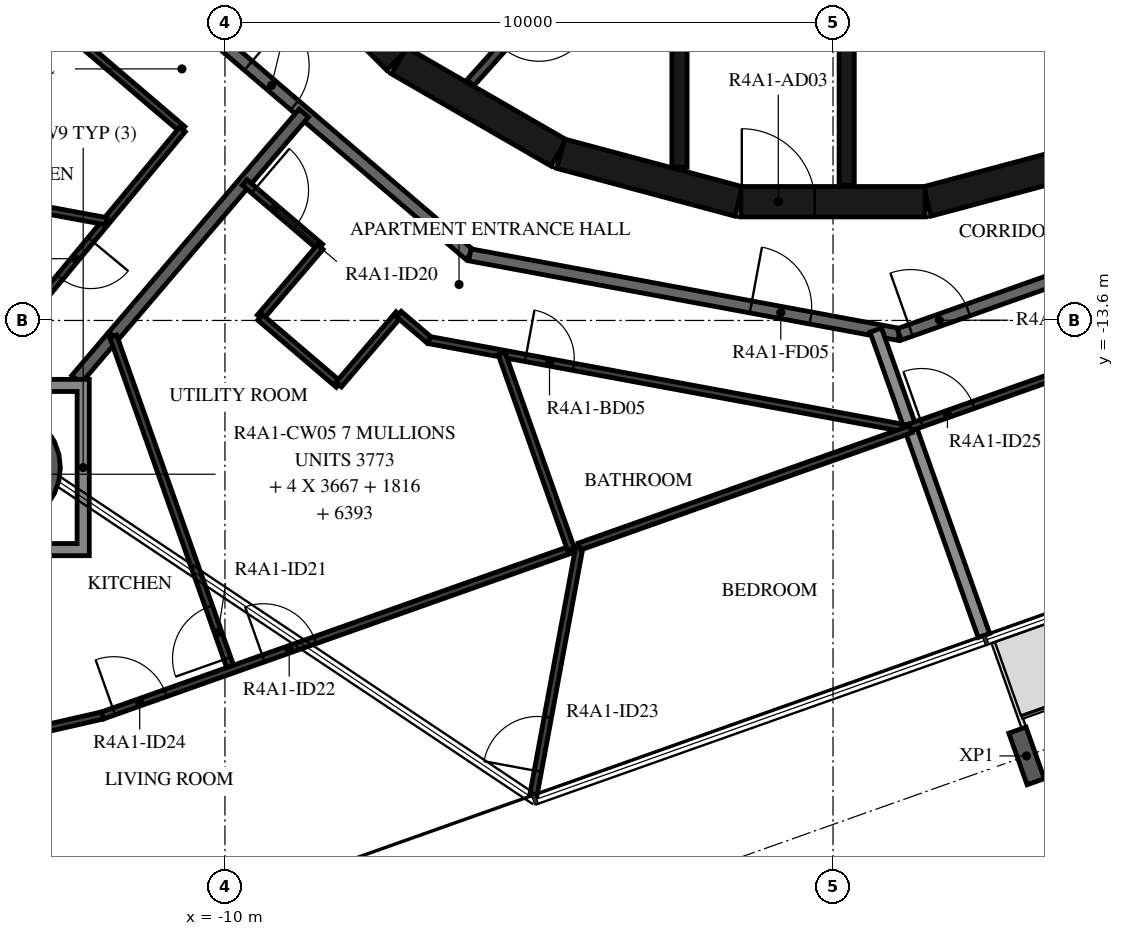
"""IFC4 building model, lengths in metres.
Left out: names, types, materials, properties, quantities, classifications, styles, units other than length and angle.
Written with IfcOpenShell. Run it as: python <this file> out.ifc"""

import sys

from ifc_helpers import new_model, si_unit, direction, frame, frame_2d, origin, origin_2d, place, context, subcontext, project, spatial, polyline, rectangle, hollow_circle, i_section, outline, extrude, element, fill, save


model = new_model("IFC4")
c1 = context("Model", 3, precision=1e-05, world=origin(), true_north=direction((0.0, 1.0)))
c2 = subcontext(c1, "Body", "Model", "MODEL_VIEW")
j1 = project(units=[si_unit("LENGTHUNIT", "METRE"), si_unit("PLANEANGLEUNIT", "RADIAN")], contexts=[c1])
p1 = place(None, origin())
s1 = spatial("IfcSite", under=j1, at=p1, CompositionType="ELEMENT")
p2 = place(p1, origin())
s2 = spatial("IfcBuilding", under=s1, at=p2, CompositionType="ELEMENT")
p3 = place(p2, frame((0.0, 0.0, 155.2)))
s3 = spatial("IfcBuildingStorey", under=s2, at=p3, CompositionType="ELEMENT", Elevation=155.2)
p4 = place(p3, frame((-13.681, -16.019, -0.38), z_axis=(0.0, 0.0, 1.0), x_axis=(1.0, 0.0, 0.0)))
e1 = element("IfcColumn", 1, at=p4, inside=s3, PredefinedType="COLUMN", context=c2, shape_type="SweptSolid", body=[
    extrude(hollow_circle(Radius=0.975, WallThickness=0.045, at=origin_2d()), origin(), (0.0, 0.0, 1.0), 3.5),
])
p5 = place(p3, frame((3.183, -20.761, -0.38), z_axis=(0.0, 0.0, 1.0), x_axis=(-0.942641392079, -0.333807138839, 0.0)))
e2 = element("IfcColumn", 2, at=p5, inside=s3, PredefinedType="COLUMN", context=c2, shape_type="SweptSolid", body=[
    extrude(i_section(OverallWidth=0.3, OverallDepth=0.9, WebThickness=0.019, FlangeThickness=0.035, FilletRadius=0.03, at=origin_2d()), origin(), (0.0, 0.0, 1.0), 3.5),
])
p6 = place(p3, frame((1.55, -11.643, 0.0), z_axis=(0.0, 0.0, 1.0), x_axis=(0.965948410781, 0.258734743916, 0.0)))
e3 = element("IfcWall", 3, at=p6, inside=s3, PredefinedType="SHEAR", context=c2, shape_type="SweptSolid", body=[
    extrude(rectangle(XDim=3.033, YDim=0.5, at=frame_2d((1.516, 0.0))), origin(), (0.0, 0.0, 1.0), 3.12),
])
p7 = place(p3, frame((-9.308, -7.164, 0.0), z_axis=(0.0, 0.0, 1.0), x_axis=(0.707106781187, -0.707106781187, 0.0)))
e4 = element("IfcWall", 4, at=p7, inside=s3, PredefinedType="SHEAR", context=c2, shape_type="SweptSolid", body=[
    extrude(rectangle(XDim=3.032, YDim=0.5, at=frame_2d((1.516, 0.0))), origin(), (0.0, 0.0, 1.0), 3.12),
])
for number, where, z_axis, x_axis in (
    (5, (-7.137, -9.329, 0.0), (0.0, 0.0, 1.0), (0.866, -0.5, 0.0)),
    (6, (-4.479, -10.858, 0.0), (0.0, 0.0, 1.0), (0.966, -0.259, 0.0)),
):
    element("IfcWall", number, at=place(p3, frame(where, z_axis=z_axis, x_axis=x_axis)), inside=s3, PredefinedType="SHEAR", context=c2, shape_type="SweptSolid", body=[
        extrude(rectangle(XDim=3.033, YDim=0.5, at=frame_2d((1.516, 0.0))), origin(), (0.0, 0.0, 1.0), 3.12),
    ])
p8 = place(p3, frame((-1.516, -11.647, 0.0), z_axis=(0.0, 0.0, 1.0), x_axis=(1.0, 0.0, 0.0)))
e7 = element("IfcWall", 7, at=p8, inside=s3, PredefinedType="SHEAR", context=c2, shape_type="SweptSolid", body=[
    extrude(rectangle(XDim=3.033, YDim=0.5, at=frame_2d((1.516, 0.0))), origin(), (0.0, 0.0, 1.0), 3.12),
])
p9 = place(p8, frame((0.016, 0.0, 0.0)))
e8 = element("IfcOpeningElement", 8, at=p9, cuts=e7, PredefinedType="OPENING", context=c2, shape_type="SweptSolid", body=[
    extrude(rectangle(XDim=1.2, YDim=2.1, at=frame_2d((0.6, 1.05))), frame((0.0, 0.26, 0.0), z_axis=(0.0, -1.0, 0.0), x_axis=(1.0, 0.0, 0.0)), (0.0, 0.0, 1.0), 0.52),
])
p10 = place(p3, frame((-2.525, -8.97, 0.0), z_axis=(0.0, 0.0, 1.0), x_axis=(0.0, -1.0, 0.0)))
e9 = element("IfcWall", 9, at=p10, inside=s3, PredefinedType="SHEAR", context=c2, shape_type="SweptSolid", body=[
    extrude(rectangle(XDim=2.11, YDim=0.25, at=frame_2d((1.055, 0.0))), origin(), (0.0, 0.0, 1.0), 3.12),
])
p11 = place(p3, frame((0.225, -8.97, 0.0), z_axis=(0.0, 0.0, 1.0), x_axis=(0.0, -1.0, 0.0)))
e10 = element("IfcWall", 10, at=p11, inside=s3, PredefinedType="SHEAR", context=c2, shape_type="SweptSolid", body=[
    extrude(rectangle(XDim=2.41, YDim=0.25, at=frame_2d((1.205, 0.0))), origin(), (0.0, 0.0, 1.0), 3.12),
])
p12 = place(p3, frame((-4.311, -7.851, 0.0), z_axis=(0.0, 0.0, 1.0), x_axis=(-0.667869133096, -0.744278725383, 0.0)))
e11 = element("IfcWall", 11, at=p12, inside=s3, PredefinedType="PARTITIONING", context=c2, shape_type="SweptSolid", body=[
    extrude(rectangle(XDim=2.476, YDim=0.15, at=frame_2d((1.238, 0.0))), origin(), (0.0, 0.0, 1.0), 3.12),
])
p13 = place(p12, frame((0.788, 0.0, 0.0)))
e12 = element("IfcOpeningElement", 12, at=p13, cuts=e11, PredefinedType="OPENING", context=c2, shape_type="SweptSolid", body=[
    extrude(rectangle(XDim=0.9, YDim=2.1, at=frame_2d((0.45, 1.05))), frame((0.0, 0.085, 0.0), z_axis=(0.0, -1.0, 0.0), x_axis=(1.0, 0.0, 0.0)), (0.0, 0.0, 1.0), 0.17),
])
p14 = place(p3, frame((-11.433, -7.858, 0.0), z_axis=(0.0, 0.0, 1.0), x_axis=(0.760412154545, -0.649440801937, 0.0)))
e13 = element("IfcWall", 13, at=p14, inside=s3, PredefinedType="STANDARD", context=c2, shape_type="SweptSolid", body=[
    extrude(rectangle(XDim=7.181, YDim=0.2, at=frame_2d((3.59, 0.0))), origin(), (0.0, 0.0, 1.0), 3.12),
])
p15 = place(p14, frame((2.39, 0.0, 0.0)))
e14 = element("IfcOpeningElement", 14, at=p15, cuts=e13, PredefinedType="OPENING", context=c2, shape_type="SweptSolid", body=[
    extrude(rectangle(XDim=1.0, YDim=2.1, at=frame_2d((0.5, 1.05))), frame((0.0, 0.11, 0.0), z_axis=(0.0, -1.0, 0.0), x_axis=(1.0, 0.0, 0.0)), (0.0, 0.0, 1.0), 0.22),
])
p16 = place(p3, frame((-5.972, -12.521, 0.0), z_axis=(0.0, 0.0, 1.0), x_axis=(0.983256068163, -0.18222926335, 0.0)))
e15 = element("IfcWall", 15, at=p16, inside=s3, PredefinedType="STANDARD", context=c2, shape_type="SweptSolid", body=[
    extrude(rectangle(XDim=7.181, YDim=0.2, at=frame_2d((3.59, 0.0))), origin(), (0.0, 0.0, 1.0), 3.12),
])
p17 = place(p16, frame((4.7, 0.0, 0.0)))
e16 = element("IfcOpeningElement", 16, at=p17, cuts=e15, PredefinedType="OPENING", context=c2, shape_type="SweptSolid", body=[
    extrude(rectangle(XDim=1.0, YDim=2.1, at=frame_2d((0.5, 1.05))), frame((0.0, 0.11, 0.0), z_axis=(0.0, -1.0, 0.0), x_axis=(1.0, 0.0, 0.0)), (0.0, 0.0, 1.0), 0.22),
])
p18 = place(p3, frame((1.088, -13.83, 0.0), z_axis=(0.0, 0.0, 1.0), x_axis=(0.942648397945, 0.333787354241, 0.0)))
e17 = element("IfcWall", 17, at=p18, inside=s3, PredefinedType="STANDARD", context=c2, shape_type="SweptSolid", body=[
    extrude(rectangle(XDim=7.181, YDim=0.2, at=frame_2d((3.591, 0.0))), origin(), (0.0, 0.0, 1.0), 3.12),
])
p19 = place(p18, frame((0.2, 0.0, 0.0)))
e18 = element("IfcOpeningElement", 18, at=p19, cuts=e17, PredefinedType="OPENING", context=c2, shape_type="SweptSolid", body=[
    extrude(rectangle(XDim=1.0, YDim=2.1, at=frame_2d((0.5, 1.05))), frame((0.0, 0.11, 0.0), z_axis=(0.0, -1.0, 0.0), x_axis=(1.0, 0.0, 0.0)), (0.0, 0.0, 1.0), 0.22),
])
p20 = place(p3, frame((-11.838, -13.86, 0.0), z_axis=(0.0, 0.0, 1.0), x_axis=(0.64944503311, 0.760408540831, 0.0)))
e19 = element("IfcWall", 19, at=p20, inside=s3, PredefinedType="STANDARD", context=c2, shape_type="SweptSolid", body=[
    extrude(rectangle(XDim=4.827, YDim=0.2, at=frame_2d((2.414, 0.0))), origin(), (0.0, 0.0, 1.0), 3.12),
])
p21 = place(p3, frame((-12.443, -14.569, 0.0), z_axis=(0.0, 0.0, 1.0), x_axis=(0.649517408851, 0.760346720648, 0.0)))
e20 = element("IfcWall", 20, at=p21, inside=s3, PredefinedType="STANDARD", context=c2, shape_type="SweptSolid", body=[
    extrude(rectangle(XDim=0.932, YDim=0.2, at=frame_2d((0.466, 0.0))), origin(), (0.0, 0.0, 1.0), 3.12),
])
p22 = place(p3, frame((2.482, -18.782, 0.0), z_axis=(0.0, 0.0, 1.0), x_axis=(-0.333807281402, 0.942641341594, 0.0)))
e21 = element("IfcWall", 21, at=p22, inside=s3, PredefinedType="STANDARD", context=c2, shape_type="SweptSolid", body=[
    extrude(rectangle(XDim=5.329, YDim=0.2, at=frame_2d((2.665, 0.0))), origin(), (0.0, 0.0, 1.0), 2.73),
])
p23 = place(p3, frame((-12.713, -8.737, 0.0), z_axis=(0.0, 0.0, 1.0), x_axis=(0.760400223405, -0.649454771517, 0.0)))
e22 = element("IfcWall", 22, at=p23, inside=s3, PredefinedType="PARTITIONING", context=c2, shape_type="SweptSolid", body=[
    extrude(rectangle(XDim=2.649, YDim=0.12, at=frame_2d((1.325, 0.0))), origin(), (0.0, 0.0, 1.0), 3.12),
])
p24 = place(p3, frame((-10.698, -10.458, 0.0), z_axis=(0.0, 0.0, 1.0), x_axis=(-0.63830561059, -0.769783052223, 0.0)))
e23 = element("IfcWall", 23, at=p24, inside=s3, PredefinedType="PARTITIONING", context=c2, shape_type="SweptSolid", body=[
    extrude(rectangle(XDim=5.131, YDim=0.12, at=frame_2d((2.565, 0.0))), origin(), (0.0, 0.0, 1.0), 3.12),
])
p25 = place(p24, frame((2.363, 0.0, 0.0)))
e24 = element("IfcOpeningElement", 24, at=p25, cuts=e23, PredefinedType="OPENING", context=c2, shape_type="SweptSolid", body=[
    extrude(rectangle(XDim=0.8, YDim=2.1, at=frame_2d((0.4, 1.05))), frame((0.0, 0.07, 0.0), z_axis=(0.0, -1.0, 0.0), x_axis=(1.0, 0.0, 0.0)), (0.0, 0.0, 1.0), 0.14),
])
p26 = place(p3, frame((-14.865, -11.428, 0.0), z_axis=(0.0, 0.0, 1.0), x_axis=(0.983255224962, -0.182233812955, 0.0)))
e25 = element("IfcWall", 25, at=p26, inside=s3, PredefinedType="PARTITIONING", context=c2, shape_type="SweptSolid", body=[
    extrude(rectangle(XDim=2.963, YDim=0.12, at=frame_2d((1.482, 0.0))), origin(), (0.0, 0.0, 1.0), 3.12),
])
p27 = place(p3, frame((-9.677, -11.33, 0.0), z_axis=(0.0, 0.0, 1.0), x_axis=(0.760372142735, -0.649487647729, 0.0)))
e26 = element("IfcWall", 26, at=p27, inside=s3, PredefinedType="PARTITIONING", context=c2, shape_type="SweptSolid", body=[
    extrude(rectangle(XDim=1.636, YDim=0.12, at=frame_2d((0.818, 0.0))), origin(), (0.0, 0.0, 1.0), 3.12),
])
p28 = place(p27, frame((0.2, 0.0, 0.0)))
e27 = element("IfcOpeningElement", 27, at=p28, cuts=e26, PredefinedType="OPENING", context=c2, shape_type="SweptSolid", body=[
    extrude(rectangle(XDim=0.9, YDim=2.1, at=frame_2d((0.45, 1.05))), frame((0.0, 0.07, 0.0), z_axis=(0.0, -1.0, 0.0), x_axis=(1.0, 0.0, 0.0)), (0.0, 0.0, 1.0), 0.14),
])
p29 = place(p3, frame((-8.433, -12.393, 0.0), z_axis=(0.0, 0.0, 1.0), x_axis=(-0.649443355674, -0.760409973482, 0.0)))
e28 = element("IfcWall", 28, at=p29, inside=s3, PredefinedType="PARTITIONING", context=c2, shape_type="SweptSolid", body=[
    extrude(rectangle(XDim=1.522, YDim=0.12, at=frame_2d((0.761, 0.0))), origin(), (0.0, 0.0, 1.0), 3.12),
])
p30 = place(p3, frame((-9.422, -13.55, 0.0), z_axis=(0.0, 0.0, 1.0), x_axis=(0.760431300628, -0.649418383652, 0.0)))
e29 = element("IfcWall", 29, at=p30, inside=s3, PredefinedType="PARTITIONING", context=c2, shape_type="SweptSolid", body=[
    extrude(rectangle(XDim=1.7, YDim=0.12, at=frame_2d((0.85, 0.0))), origin(), (0.0, 0.0, 1.0), 3.12),
])
p31 = place(p3, frame((-8.129, -14.654, 0.0), z_axis=(0.0, 0.0, 1.0), x_axis=(0.649443355674, 0.760409973482, 0.0)))
e30 = element("IfcWall", 30, at=p31, inside=s3, PredefinedType="PARTITIONING", context=c2, shape_type="SweptSolid", body=[
    extrude(rectangle(XDim=1.522, YDim=0.12, at=frame_2d((0.761, 0.0))), origin(), (0.0, 0.0, 1.0), 3.12),
])
p32 = place(p3, frame((-7.14, -13.497, 0.0), z_axis=(0.0, 0.0, 1.0), x_axis=(0.760515230334, -0.649320093967, 0.0)))
e31 = element("IfcWall", 31, at=p32, inside=s3, PredefinedType="PARTITIONING", context=c2, shape_type="SweptSolid", body=[
    extrude(rectangle(XDim=0.656, YDim=0.12, at=frame_2d((0.328, 0.0))), origin(), (0.0, 0.0, 1.0), 3.12),
])
p33 = place(p3, frame((-6.641, -13.923, 0.0), z_axis=(0.0, 0.0, 1.0), x_axis=(0.983250157272, -0.182261153912, 0.0)))
e32 = element("IfcWall", 32, at=p33, inside=s3, PredefinedType="PARTITIONING", context=c2, shape_type="SweptSolid", body=[
    extrude(rectangle(XDim=7.985, YDim=0.12, at=frame_2d((3.992, 0.0))), origin(), (0.0, 0.0, 1.0), 3.12),
])
p34 = place(p33, frame((1.612, 0.0, 0.0)))
e33 = element("IfcOpeningElement", 33, at=p34, cuts=e32, PredefinedType="OPENING", context=c2, shape_type="SweptSolid", body=[
    extrude(rectangle(XDim=0.8, YDim=2.1, at=frame_2d((0.4, 1.05))), frame((0.0, 0.07, 0.0), z_axis=(0.0, -1.0, 0.0), x_axis=(1.0, 0.0, 0.0)), (0.0, 0.0, 1.0), 0.14),
])
p35 = place(p3, frame((-9.895, -19.346, 0.0), z_axis=(0.0, 0.0, 1.0), x_axis=(-0.333781129158, 0.942650602195, 0.0)))
e34 = element("IfcWall", 34, at=p35, inside=s3, PredefinedType="PARTITIONING", context=c2, shape_type="SweptSolid", body=[
    extrude(rectangle(XDim=5.819, YDim=0.12, at=frame_2d((2.91, 0.0))), origin(), (0.0, 0.0, 1.0), 3.12),
])
p36 = place(p35, frame((0.2, 0.0, 0.0)))
e35 = element("IfcOpeningElement", 35, at=p36, cuts=e34, PredefinedType="OPENING", context=c2, shape_type="SweptSolid", body=[
    extrude(rectangle(XDim=0.9, YDim=2.1, at=frame_2d((0.45, 1.05))), frame((0.0, 0.07, 0.0), z_axis=(0.0, -1.0, 0.0), x_axis=(1.0, 0.0, 0.0)), (0.0, 0.0, 1.0), 0.14),
])
p37 = place(p3, frame((-13.211, -20.369, 0.0), z_axis=(0.0, 0.0, 1.0), x_axis=(0.974997834831, 0.222214360642, 0.0)))
e36 = element("IfcWall", 36, at=p37, inside=s3, PredefinedType="PARTITIONING", context=c2, shape_type="SweptSolid", body=[
    extrude(rectangle(XDim=1.227, YDim=0.12, at=frame_2d((0.614, 0.0))), origin(), (0.0, 0.0, 1.0), 3.12),
])
p38 = place(p3, frame((-12.015, -20.096, 0.0), z_axis=(0.0, 0.0, 1.0), x_axis=(0.942638718556, 0.333814688531, 0.0)))
e37 = element("IfcWall", 37, at=p38, inside=s3, PredefinedType="PARTITIONING", context=c2, shape_type="SweptSolid", body=[
    extrude(rectangle(XDim=8.216, YDim=0.12, at=frame_2d((4.108, 0.0))), origin(), (0.0, 0.0, 1.0), 3.12),
])
p39 = place(p38, frame((2.809, 0.0, 0.0)))
e38 = element("IfcOpeningElement", 38, at=p39, cuts=e37, PredefinedType="OPENING", context=c2, shape_type="SweptSolid", body=[
    extrude(rectangle(XDim=0.9, YDim=2.1, at=frame_2d((0.45, 1.05))), frame((0.0, 0.07, 0.0), z_axis=(0.0, -1.0, 0.0), x_axis=(1.0, 0.0, 0.0)), (0.0, 0.0, 1.0), 0.14),
])
p40 = place(p38, frame((0.2, 0.0, 0.0)))
e39 = element("IfcOpeningElement", 39, at=p40, cuts=e37, PredefinedType="OPENING", context=c2, shape_type="SweptSolid", body=[
    extrude(rectangle(XDim=0.9, YDim=2.1, at=frame_2d((0.45, 1.05))), frame((0.0, 0.07, 0.0), z_axis=(0.0, -1.0, 0.0), x_axis=(1.0, 0.0, 0.0)), (0.0, 0.0, 1.0), 0.14),
])
p41 = place(p3, frame((-4.308, -17.367, 0.0), z_axis=(0.0, 0.0, 1.0), x_axis=(-0.333802202677, 0.942643140052, 0.0)))
e40 = element("IfcWall", 40, at=p41, inside=s3, PredefinedType="PARTITIONING", context=c2, shape_type="SweptSolid", body=[
    extrude(rectangle(XDim=3.419, YDim=0.12, at=frame_2d((1.709, 0.0))), origin(), (0.0, 0.0, 1.0), 3.12),
])
p42 = place(p3, frame((-4.927, -21.406, 0.0), z_axis=(0.0, 0.0, 1.0), x_axis=(0.182238575099, 0.983254342348, 0.0)))
e41 = element("IfcWall", 41, at=p42, inside=s3, PredefinedType="PARTITIONING", context=c2, shape_type="SweptSolid", body=[
    extrude(rectangle(XDim=4.157, YDim=0.12, at=frame_2d((2.079, 0.0))), origin(), (0.0, 0.0, 1.0), 3.12),
])
p43 = place(p42, frame((0.4, 0.0, 0.0)))
e42 = element("IfcOpeningElement", 42, at=p43, cuts=e41, PredefinedType="OPENING", context=c2, shape_type="SweptSolid", body=[
    extrude(rectangle(XDim=0.9, YDim=2.1, at=frame_2d((0.45, 1.05))), frame((0.0, 0.07, 0.0), z_axis=(0.0, -1.0, 0.0), x_axis=(1.0, 0.0, 0.0)), (0.0, 0.0, 1.0), 0.14),
])
p44 = place(p3, frame((-4.17, -17.318, 0.0), z_axis=(0.0, 0.0, 1.0), x_axis=(0.942641343532, 0.333807275931, 0.0)))
e43 = element("IfcWall", 43, at=p44, inside=s3, PredefinedType="PARTITIONING", context=c2, shape_type="SweptSolid", body=[
    extrude(rectangle(XDim=5.781, YDim=0.12, at=frame_2d((2.891, 0.0))), origin(), (0.0, 0.0, 1.0), 3.12),
])
p45 = place(p3, frame((1.269, -15.357, 0.0), z_axis=(0.0, 0.0, 1.0), x_axis=(0.942639442898, 0.333812643101, 0.0)))
e44 = element("IfcWall", 44, at=p45, inside=s3, PredefinedType="PARTITIONING", context=c2, shape_type="SweptSolid", body=[
    extrude(rectangle(XDim=7.86, YDim=0.12, at=frame_2d((3.93, 0.0))), origin(), (0.0, 0.0, 1.0), 3.12),
])
p46 = place(p45, frame((0.2, 0.0, 0.0)))
e45 = element("IfcOpeningElement", 45, at=p46, cuts=e44, PredefinedType="OPENING", context=c2, shape_type="SweptSolid", body=[
    extrude(rectangle(XDim=0.9, YDim=2.1, at=frame_2d((0.45, 1.05))), frame((0.0, 0.07, 0.0), z_axis=(0.0, -1.0, 0.0), x_axis=(1.0, 0.0, 0.0)), (0.0, 0.0, 1.0), 0.14),
])
p47 = place(p3, origin())
e46 = element("IfcWall", 46, at=p47, inside=s3, PredefinedType="STANDARD", context=c2, shape_type="SweptSolid", body=[
    extrude(outline(polyline([(-12.231, -14.569), (-12.231, -17.469), (-15.131, -17.469), (-15.131, -14.569), (-12.231, -14.569)]), holes=[polyline([(-14.931, -17.269), (-12.431, -17.269), (-12.431, -14.769), (-14.931, -14.769), (-14.931, -17.269)])]), origin(), (0.0, 0.0, 1.0), 3.12),
])
p48 = place(p9, origin())
e47 = element("IfcDoor", 47, at=p48, inside=s3, OperationType="SINGLE_SWING_RIGHT", PredefinedType="DOOR", context=c2, shape_type="SweptSolid", body=[
    extrude(rectangle(XDim=1.2, YDim=2.1, at=frame_2d((0.6, 1.05))), frame((0.0, 0.025, 0.0), z_axis=(0.0, -1.0, 0.0), x_axis=(1.0, 0.0, 0.0)), (0.0, 0.0, 1.0), 0.05),
])
fill(e8, e47)
p49 = place(p15, origin())
e48 = element("IfcDoor", 48, at=p49, inside=s3, OperationType="SINGLE_SWING_RIGHT", PredefinedType="DOOR", context=c2, shape_type="SweptSolid", body=[
    extrude(rectangle(XDim=1.0, YDim=2.1, at=frame_2d((0.5, 1.05))), frame((0.0, 0.025, 0.0), z_axis=(0.0, -1.0, 0.0), x_axis=(1.0, 0.0, 0.0)), (0.0, 0.0, 1.0), 0.05),
])
fill(e14, e48)
p50 = place(p25, origin())
e49 = element("IfcDoor", 49, at=p50, inside=s3, OperationType="SINGLE_SWING_RIGHT", PredefinedType="DOOR", context=c2, shape_type="SweptSolid", body=[
    extrude(rectangle(XDim=0.8, YDim=2.1, at=frame_2d((0.4, 1.05))), frame((0.0, 0.025, 0.0), z_axis=(0.0, -1.0, 0.0), x_axis=(1.0, 0.0, 0.0)), (0.0, 0.0, 1.0), 0.05),
])
fill(e24, e49)
p51 = place(p17, origin())
e50 = element("IfcDoor", 50, at=p51, inside=s3, OperationType="SINGLE_SWING_LEFT", PredefinedType="DOOR", context=c2, shape_type="SweptSolid", body=[
    extrude(rectangle(XDim=1.0, YDim=2.1, at=frame_2d((0.5, 1.05))), frame((0.0, 0.025, 0.0), z_axis=(0.0, -1.0, 0.0), x_axis=(1.0, 0.0, 0.0)), (0.0, 0.0, 1.0), 0.05),
])
fill(e16, e50)
p52 = place(p28, origin())
e51 = element("IfcDoor", 51, at=p52, inside=s3, OperationType="SINGLE_SWING_LEFT", PredefinedType="DOOR", context=c2, shape_type="SweptSolid", body=[
    extrude(rectangle(XDim=0.9, YDim=2.1, at=frame_2d((0.45, 1.05))), frame((0.0, 0.025, 0.0), z_axis=(0.0, -1.0, 0.0), x_axis=(1.0, 0.0, 0.0)), (0.0, 0.0, 1.0), 0.05),
])
fill(e27, e51)
p53 = place(p34, origin())
e52 = element("IfcDoor", 52, at=p53, inside=s3, OperationType="SINGLE_SWING_LEFT", PredefinedType="DOOR", context=c2, shape_type="SweptSolid", body=[
    extrude(rectangle(XDim=0.8, YDim=2.1, at=frame_2d((0.4, 1.05))), frame((0.0, 0.025, 0.0), z_axis=(0.0, -1.0, 0.0), x_axis=(1.0, 0.0, 0.0)), (0.0, 0.0, 1.0), 0.05),
])
fill(e33, e52)
p54 = place(p36, origin())
e53 = element("IfcDoor", 53, at=p54, inside=s3, OperationType="SINGLE_SWING_LEFT", PredefinedType="DOOR", context=c2, shape_type="SweptSolid", body=[
    extrude(rectangle(XDim=0.9, YDim=2.1, at=frame_2d((0.45, 1.05))), frame((0.0, 0.025, 0.0), z_axis=(0.0, -1.0, 0.0), x_axis=(1.0, 0.0, 0.0)), (0.0, 0.0, 1.0), 0.05),
])
fill(e35, e53)
p55 = place(p39, origin())
e54 = element("IfcDoor", 54, at=p55, inside=s3, OperationType="SINGLE_SWING_LEFT", PredefinedType="DOOR", context=c2, shape_type="SweptSolid", body=[
    extrude(rectangle(XDim=0.9, YDim=2.1, at=frame_2d((0.45, 1.05))), frame((0.0, 0.025, 0.0), z_axis=(0.0, -1.0, 0.0), x_axis=(1.0, 0.0, 0.0)), (0.0, 0.0, 1.0), 0.05),
])
fill(e38, e54)
p56 = place(p43, origin())
e55 = element("IfcDoor", 55, at=p56, inside=s3, OperationType="SINGLE_SWING_RIGHT", PredefinedType="DOOR", context=c2, shape_type="SweptSolid", body=[
    extrude(rectangle(XDim=0.9, YDim=2.1, at=frame_2d((0.45, 1.05))), frame((0.0, 0.025, 0.0), z_axis=(0.0, -1.0, 0.0), x_axis=(1.0, 0.0, 0.0)), (0.0, 0.0, 1.0), 0.05),
])
fill(e42, e55)
p57 = place(p40, origin())
e56 = element("IfcDoor", 56, at=p57, inside=s3, OperationType="SINGLE_SWING_LEFT", PredefinedType="DOOR", context=c2, shape_type="SweptSolid", body=[
    extrude(rectangle(XDim=0.9, YDim=2.1, at=frame_2d((0.45, 1.05))), frame((0.0, 0.025, 0.0), z_axis=(0.0, -1.0, 0.0), x_axis=(1.0, 0.0, 0.0)), (0.0, 0.0, 1.0), 0.05),
])
fill(e39, e56)
p58 = place(p19, origin())
e57 = element("IfcDoor", 57, at=p58, inside=s3, OperationType="SINGLE_SWING_LEFT", PredefinedType="DOOR", context=c2, shape_type="SweptSolid", body=[
    extrude(rectangle(XDim=1.0, YDim=2.1, at=frame_2d((0.5, 1.05))), frame((0.0, 0.025, 0.0), z_axis=(0.0, -1.0, 0.0), x_axis=(1.0, 0.0, 0.0)), (0.0, 0.0, 1.0), 0.05),
])
fill(e18, e57)
p59 = place(p46, origin())
e58 = element("IfcDoor", 58, at=p59, inside=s3, OperationType="SINGLE_SWING_LEFT", PredefinedType="DOOR", context=c2, shape_type="SweptSolid", body=[
    extrude(rectangle(XDim=0.9, YDim=2.1, at=frame_2d((0.45, 1.05))), frame((0.0, 0.025, 0.0), z_axis=(0.0, -1.0, 0.0), x_axis=(1.0, 0.0, 0.0)), (0.0, 0.0, 1.0), 0.05),
])
fill(e45, e58)
save(model, sys.argv[1])
